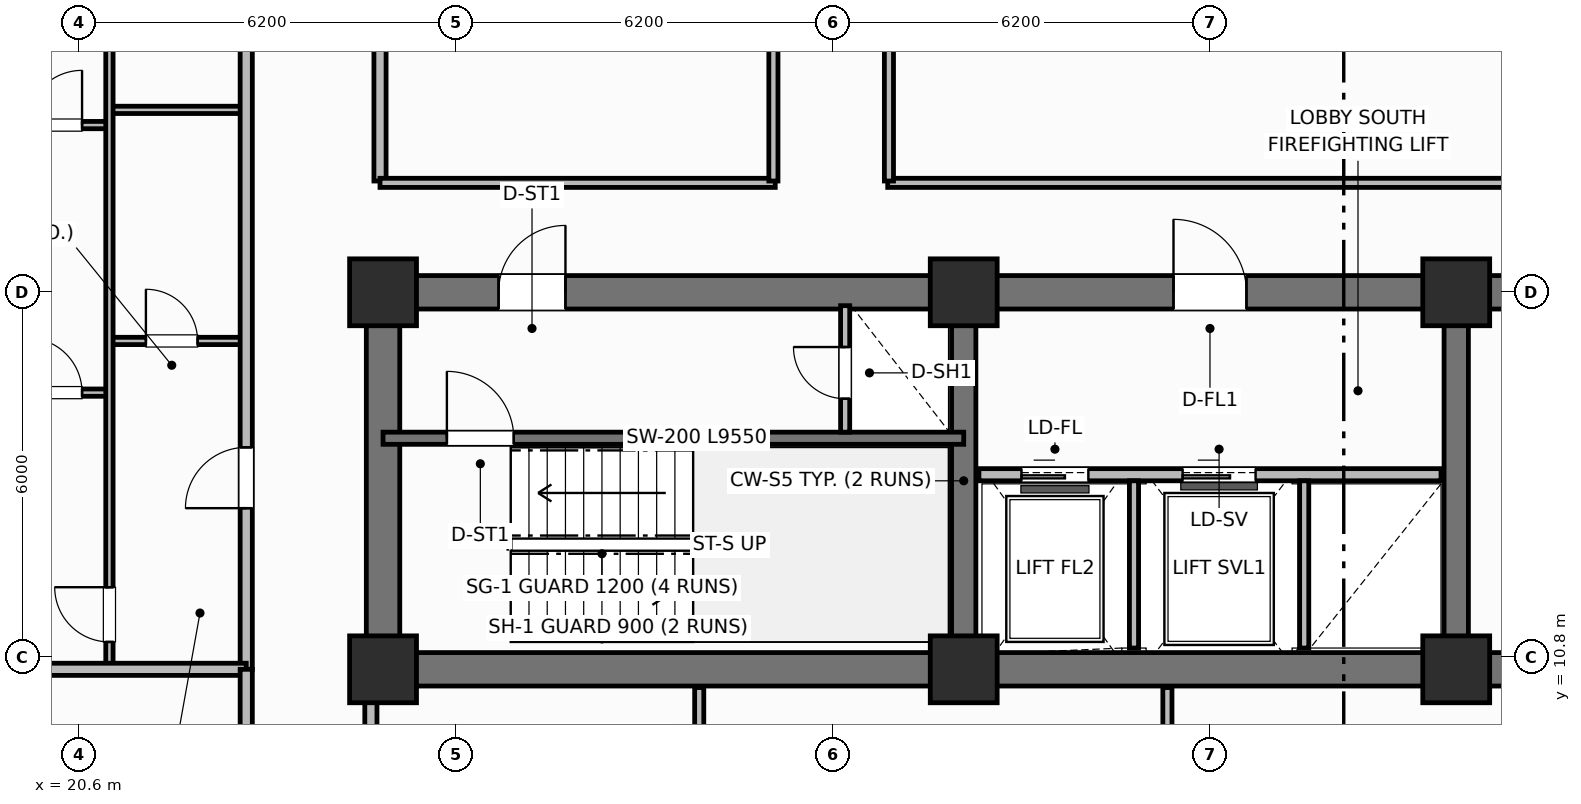
"""IFC4 building model, lengths in metres.
Left out: names, types, materials, properties, quantities, classifications, styles, units other than length and angle.
Written with IfcOpenShell. Run it as: python <this file> out.ifc"""

import sys

from ifc_helpers import new_model, si_unit, direction, frame, frame_2d, origin, origin_2d, place, context, subcontext, project, spatial, rectangle, extrude, element, fill, save


model = new_model("IFC4")
c1 = context("Model", 3, precision=1e-05, world=origin(), true_north=direction((0.0, 1.0)))
c2 = subcontext(c1, "Body", "Model", "MODEL_VIEW")
j1 = project(units=[si_unit("LENGTHUNIT", "METRE"), si_unit("PLANEANGLEUNIT", "RADIAN")], contexts=[c1])
p1 = place(None, origin())
s1 = spatial("IfcSite", under=j1, at=p1, CompositionType="ELEMENT")
p2 = place(p1, origin())
s2 = spatial("IfcBuilding", under=s1, at=p2, CompositionType="ELEMENT")
p3 = place(p2, frame((0.0, 0.0, 92.0)))
s3 = spatial("IfcBuildingStorey", under=s2, at=p3, CompositionType="ELEMENT", Elevation=92.0)
p4 = place(p3, frame((52.8, 10.6, 0.0), z_axis=(0.0, 0.0, 1.0), x_axis=(-1.0, 0.0, 0.0)))
e1 = element("IfcWall", 1, at=p4, inside=s3, PredefinedType="SHEAR", context=c2, shape_type="SweptSolid", body=[
    extrude(rectangle(XDim=27.2, YDim=0.55, at=frame_2d((13.6, 0.0))), origin(), (0.0, 0.0, 1.0), 3.7),
])
p5 = place(p3, frame((25.6, 10.875, 0.0), z_axis=(0.0, 0.0, 1.0), x_axis=(0.0, 1.0, 0.0)))
e2 = element("IfcWall", 2, at=p5, inside=s3, PredefinedType="SHEAR", context=c2, shape_type="SweptSolid", body=[
    extrude(rectangle(XDim=5.65, YDim=0.55, at=frame_2d((2.825, 0.0))), origin(), (0.0, 0.0, 1.0), 3.7),
])
p6 = place(p3, frame((25.6, 16.8, 0.0), z_axis=(0.0, 0.0, 1.0), x_axis=(1.0, 0.0, 0.0)))
e3 = element("IfcWall", 3, at=p6, inside=s3, PredefinedType="SHEAR", context=c2, shape_type="SweptSolid", body=[
    extrude(rectangle(XDim=27.2, YDim=0.55, at=frame_2d((13.6, 0.0))), origin(), (0.0, 0.0, 1.0), 3.7),
])
p7 = place(p6, frame((1.9, 0.0, 0.0)))
e4 = element("IfcOpeningElement", 4, at=p7, cuts=e3, PredefinedType="OPENING", context=c2, shape_type="SweptSolid", body=[
    extrude(rectangle(XDim=1.1, YDim=2.15, at=frame_2d((0.55, 1.075))), frame((0.0, 0.285, 0.0), z_axis=(0.0, -1.0, 0.0), x_axis=(1.0, 0.0, 0.0)), (0.0, 0.0, 1.0), 0.57),
])
p8 = place(p6, frame((13.0, 0.0, 0.0)))
e5 = element("IfcOpeningElement", 5, at=p8, cuts=e3, PredefinedType="OPENING", context=c2, shape_type="SweptSolid", body=[
    extrude(rectangle(XDim=1.2, YDim=2.15, at=frame_2d((0.6, 1.075))), frame((0.0, 0.285, 0.0), z_axis=(0.0, -1.0, 0.0), x_axis=(1.0, 0.0, 0.0)), (0.0, 0.0, 1.0), 0.57),
])
p9 = place(p6, frame((21.6, 0.0, 0.0)))
e6 = element("IfcOpeningElement", 6, at=p9, cuts=e3, PredefinedType="OPENING", context=c2, shape_type="SweptSolid", body=[
    extrude(rectangle(XDim=1.0, YDim=2.15, at=frame_2d((0.5, 1.075))), frame((0.0, 0.285, 0.0), z_axis=(0.0, -1.0, 0.0), x_axis=(1.0, 0.0, 0.0)), (0.0, 0.0, 1.0), 0.57),
])
for number, where, z_axis, x_axis in (
    (7, (35.15, 10.875, 0.0), (0.0, 0.0, 1.0), (0.0, 1.0, 0.0)),
    (8, (43.25, 10.875, 0.0), (0.0, 0.0, 1.0), (0.0, 1.0, 0.0)),
):
    element("IfcWall", number, at=place(p3, frame(where, z_axis=z_axis, x_axis=x_axis)), inside=s3, PredefinedType="SHEAR", context=c2, shape_type="SweptSolid", body=[
        extrude(rectangle(XDim=5.65, YDim=0.4, at=frame_2d((2.825, 0.0))), origin(), (0.0, 0.0, 1.0), 3.7),
    ])
for number, where, z_axis, x_axis in (
    (9, (25.6, 10.6, 0.0), (0.0, 0.0, 1.0), (1.0, 0.0, 0.0)),
    (10, (25.6, 16.8, 0.0), (0.0, 0.0, 1.0), (1.0, 0.0, 0.0)),
    (11, (35.15, 10.6, 0.0), (0.0, 0.0, 1.0), (1.0, 0.0, 0.0)),
    (12, (35.15, 16.8, 0.0), (0.0, 0.0, 1.0), (1.0, 0.0, 0.0)),
    (13, (43.25, 10.6, 0.0), (0.0, 0.0, 1.0), (1.0, 0.0, 0.0)),
    (14, (43.25, 16.8, 0.0), (0.0, 0.0, 1.0), (1.0, 0.0, 0.0)),
):
    element("IfcColumn", number, at=place(p3, frame(where, z_axis=z_axis, x_axis=x_axis)), inside=s3, PredefinedType="COLUMN", context=c2, shape_type="SweptSolid", body=[
        extrude(rectangle(XDim=1.1, YDim=1.1, at=origin_2d()), origin(), (0.0, 0.0, 1.0), 3.7),
    ])
p10 = place(p3, frame((25.6, 14.4, 0.0), z_axis=(0.0, 0.0, 1.0), x_axis=(1.0, 0.0, 0.0)))
e15 = element("IfcWall", 15, at=p10, inside=s3, PredefinedType="SHEAR", context=c2, shape_type="SweptSolid", body=[
    extrude(rectangle(XDim=9.55, YDim=0.2, at=frame_2d((4.775, 0.0))), origin(), (0.0, 0.0, 1.0), 3.7),
])
p11 = place(p10, frame((1.05, 0.0, 0.0)))
e16 = element("IfcOpeningElement", 16, at=p11, cuts=e15, PredefinedType="OPENING", context=c2, shape_type="SweptSolid", body=[
    extrude(rectangle(XDim=1.1, YDim=2.15, at=frame_2d((0.55, 1.075))), frame((0.0, 0.11, 0.0), z_axis=(0.0, -1.0, 0.0), x_axis=(1.0, 0.0, 0.0)), (0.0, 0.0, 1.0), 0.22),
])
p12 = place(p3, frame((33.2, 14.5, 0.0), z_axis=(0.0, 0.0, 1.0), x_axis=(0.0, 1.0, 0.0)))
e17 = element("IfcWall", 17, at=p12, inside=s3, PredefinedType="PARTITIONING", context=c2, shape_type="SweptSolid", body=[
    extrude(rectangle(XDim=2.08, YDim=0.15, at=frame_2d((1.04, 0.0))), origin(), (0.0, 0.0, 1.0), 2.53),
])
p13 = place(p12, frame((0.55, 0.0, 0.0)))
e18 = element("IfcOpeningElement", 18, at=p13, cuts=e17, PredefinedType="OPENING", context=c2, shape_type="SweptSolid", body=[
    extrude(rectangle(XDim=0.85, YDim=2.05, at=frame_2d((0.425, 1.025))), frame((0.0, 0.085, 0.0), z_axis=(0.0, -1.0, 0.0), x_axis=(1.0, 0.0, 0.0)), (0.0, 0.0, 1.0), 0.17),
])
p14 = place(p3, frame((35.4, 13.8, 0.0), z_axis=(0.0, 0.0, 1.0), x_axis=(1.0, 0.0, 0.0)))
e19 = element("IfcWall", 19, at=p14, inside=s3, PredefinedType="PARTITIONING", context=c2, shape_type="SweptSolid", body=[
    extrude(rectangle(XDim=7.6, YDim=0.2, at=frame_2d((3.8, 0.0))), origin(), (0.0, 0.0, 1.0), 2.3),
])
p15 = place(p14, frame((0.7, 0.0, 0.0)))
e20 = element("IfcOpeningElement", 20, at=p15, cuts=e19, PredefinedType="OPENING", context=c2, shape_type="SweptSolid", body=[
    extrude(rectangle(XDim=1.1, YDim=2.15, at=frame_2d((0.55, 1.075))), frame((0.0, 0.11, 0.0), z_axis=(0.0, -1.0, 0.0), x_axis=(1.0, 0.0, 0.0)), (0.0, 0.0, 1.0), 0.22),
])
p16 = place(p14, frame((3.35, 0.0, 0.0)))
e21 = element("IfcOpeningElement", 21, at=p16, cuts=e19, PredefinedType="OPENING", context=c2, shape_type="SweptSolid", body=[
    extrude(rectangle(XDim=1.2, YDim=2.15, at=frame_2d((0.6, 1.075))), frame((0.0, 0.11, 0.0), z_axis=(0.0, -1.0, 0.0), x_axis=(1.0, 0.0, 0.0)), (0.0, 0.0, 1.0), 0.22),
])
for number, where, z_axis, x_axis in (
    (22, (37.95, 10.95, 0.0), (0.0, 0.0, 1.0), (0.0, 1.0, 0.0)),
    (23, (40.75, 10.95, 0.0), (0.0, 0.0, 1.0), (0.0, 1.0, 0.0)),
):
    element("IfcWall", number, at=place(p3, frame(where, z_axis=z_axis, x_axis=x_axis)), inside=s3, PredefinedType="PARTITIONING", context=c2, shape_type="SweptSolid", body=[
        extrude(rectangle(XDim=2.75, YDim=0.15, at=frame_2d((1.375, 0.0))), origin(), (0.0, 0.0, 1.0), 2.53),
    ])
p17 = place(p3, frame((25.55, 18.63, 0.0), z_axis=(0.0, 0.0, 1.0), x_axis=(0.0, 1.0, 0.0)))
e24 = element("IfcWall", 24, at=p17, inside=s3, PredefinedType="PARTITIONING", context=c2, shape_type="SweptSolid", body=[
    extrude(rectangle(XDim=19.14, YDim=0.2, at=frame_2d((9.57, 0.0))), origin(), (0.0, 0.0, 1.0), 2.53),
])
p18 = place(p3, frame((25.55, 18.6, 0.0), z_axis=(0.0, 0.0, 1.0), x_axis=(1.0, 0.0, 0.0)))
e25 = element("IfcWall", 25, at=p18, inside=s3, PredefinedType="PARTITIONING", context=c2, shape_type="SweptSolid", body=[
    extrude(rectangle(XDim=6.5, YDim=0.15, at=frame_2d((3.25, 0.0))), origin(), (0.0, 0.0, 1.0), 2.53),
])
p19 = place(p3, frame((33.9, 18.6, 0.0), z_axis=(0.0, 0.0, 1.0), x_axis=(1.0, 0.0, 0.0)))
e26 = element("IfcWall", 26, at=p19, inside=s3, PredefinedType="PARTITIONING", context=c2, shape_type="SweptSolid", body=[
    extrude(rectangle(XDim=10.6, YDim=0.15, at=frame_2d((5.3, 0.0))), origin(), (0.0, 0.0, 1.0), 2.53),
])
p20 = place(p3, frame((32.02, 18.63, 0.0), z_axis=(0.0, 0.0, 1.0), x_axis=(0.0, 1.0, 0.0)))
e27 = element("IfcWall", 27, at=p20, inside=s3, PredefinedType="PARTITIONING", context=c2, shape_type="SweptSolid", body=[
    extrude(rectangle(XDim=19.14, YDim=0.15, at=frame_2d((9.57, 0.0))), origin(), (0.0, 0.0, 1.0), 2.53),
])
p21 = place(p20, frame((3.0, 0.0, 0.0)))
e28 = element("IfcOpeningElement", 28, at=p21, cuts=e27, PredefinedType="OPENING", context=c2, shape_type="SweptSolid", body=[
    extrude(rectangle(XDim=0.9, YDim=2.1, at=frame_2d((0.45, 1.05))), frame((0.0, 0.085, 0.0), z_axis=(0.0, -1.0, 0.0), x_axis=(1.0, 0.0, 0.0)), (0.0, 0.0, 1.0), 0.17),
])
p22 = place(p20, frame((11.5, 0.0, 0.0)))
e29 = element("IfcOpeningElement", 29, at=p22, cuts=e27, PredefinedType="OPENING", context=c2, shape_type="SweptSolid", body=[
    extrude(rectangle(XDim=0.9, YDim=2.1, at=frame_2d((0.45, 1.05))), frame((0.0, 0.085, 0.0), z_axis=(0.0, -1.0, 0.0), x_axis=(1.0, 0.0, 0.0)), (0.0, 0.0, 1.0), 0.17),
])
p23 = place(p3, frame((33.92, 18.63, 0.0), z_axis=(0.0, 0.0, 1.0), x_axis=(0.0, 1.0, 0.0)))
e30 = element("IfcWall", 30, at=p23, inside=s3, PredefinedType="PARTITIONING", context=c2, shape_type="SweptSolid", body=[
    extrude(rectangle(XDim=19.14, YDim=0.15, at=frame_2d((9.57, 0.0))), origin(), (0.0, 0.0, 1.0), 2.53),
])
p24 = place(p23, frame((2.4, 0.0, 0.0)))
e31 = element("IfcOpeningElement", 31, at=p24, cuts=e30, PredefinedType="OPENING", context=c2, shape_type="SweptSolid", body=[
    extrude(rectangle(XDim=0.9, YDim=2.1, at=frame_2d((0.45, 1.05))), frame((0.0, 0.085, 0.0), z_axis=(0.0, -1.0, 0.0), x_axis=(1.0, 0.0, 0.0)), (0.0, 0.0, 1.0), 0.17),
])
p25 = place(p3, frame((21.1, 16.0, 0.0), z_axis=(0.0, 0.0, 1.0), x_axis=(1.0, 0.0, 0.0)))
e32 = element("IfcWall", 32, at=p25, inside=s3, PredefinedType="PARTITIONING", context=c2, shape_type="SweptSolid", body=[
    extrude(rectangle(XDim=2.25, YDim=0.12, at=frame_2d((1.125, 0.0))), origin(), (0.0, 0.0, 1.0), 2.53),
])
p26 = place(p25, frame((0.6, 0.0, 0.0)))
e33 = element("IfcOpeningElement", 33, at=p26, cuts=e32, PredefinedType="OPENING", context=c2, shape_type="SweptSolid", body=[
    extrude(rectangle(XDim=0.85, YDim=2.1, at=frame_2d((0.425, 1.05))), frame((0.0, 0.07, 0.0), z_axis=(0.0, -1.0, 0.0), x_axis=(1.0, 0.0, 0.0)), (0.0, 0.0, 1.0), 0.14),
])
p27 = place(p3, frame((21.1, 19.8, 0.0), z_axis=(0.0, 0.0, 1.0), x_axis=(1.0, 0.0, 0.0)))
e34 = element("IfcWall", 34, at=p27, inside=s3, PredefinedType="PARTITIONING", context=c2, shape_type="SweptSolid", body=[
    extrude(rectangle(XDim=2.25, YDim=0.12, at=frame_2d((1.125, 0.0))), origin(), (0.0, 0.0, 1.0), 2.53),
])
p28 = place(p3, frame((14.57, 15.15, 0.0), z_axis=(0.0, 0.0, 1.0), x_axis=(1.0, 0.0, 0.0)))
e35 = element("IfcWall", 35, at=p28, inside=s3, PredefinedType="PARTITIONING", context=c2, shape_type="SweptSolid", body=[
    extrude(rectangle(XDim=6.53, YDim=0.12, at=frame_2d((3.265, 0.0))), origin(), (0.0, 0.0, 1.0), 2.53),
])
p29 = place(p28, frame((5.18, 0.0, 0.0)))
e36 = element("IfcOpeningElement", 36, at=p29, cuts=e35, PredefinedType="OPENING", context=c2, shape_type="SweptSolid", body=[
    extrude(rectangle(XDim=0.9, YDim=2.1, at=frame_2d((0.45, 1.05))), frame((0.0, 0.07, 0.0), z_axis=(0.0, -1.0, 0.0), x_axis=(1.0, 0.0, 0.0)), (0.0, 0.0, 1.0), 0.14),
])
p30 = place(p3, frame((14.57, 19.55, 0.0), z_axis=(0.0, 0.0, 1.0), x_axis=(1.0, 0.0, 0.0)))
e37 = element("IfcWall", 37, at=p30, inside=s3, PredefinedType="PARTITIONING", context=c2, shape_type="SweptSolid", body=[
    extrude(rectangle(XDim=6.53, YDim=0.12, at=frame_2d((3.265, 0.0))), origin(), (0.0, 0.0, 1.0), 2.53),
])
p31 = place(p30, frame((5.18, 0.0, 0.0)))
e38 = element("IfcOpeningElement", 38, at=p31, cuts=e37, PredefinedType="OPENING", context=c2, shape_type="SweptSolid", body=[
    extrude(rectangle(XDim=0.9, YDim=2.1, at=frame_2d((0.45, 1.05))), frame((0.0, 0.07, 0.0), z_axis=(0.0, -1.0, 0.0), x_axis=(1.0, 0.0, 0.0)), (0.0, 0.0, 1.0), 0.14),
])
p32 = place(p3, frame((21.1, 10.64, 0.0), z_axis=(0.0, 0.0, 1.0), x_axis=(0.0, 1.0, 0.0)))
e39 = element("IfcWall", 39, at=p32, inside=s3, PredefinedType="PARTITIONING", context=c2, shape_type="SweptSolid", body=[
    extrude(rectangle(XDim=19.12, YDim=0.12, at=frame_2d((9.56, 0.0))), origin(), (0.0, 0.0, 1.0), 2.53),
])
p33 = place(p32, frame((0.41, 0.0, 0.0)))
e40 = element("IfcOpeningElement", 40, at=p33, cuts=e39, PredefinedType="OPENING", context=c2, shape_type="SweptSolid", body=[
    extrude(rectangle(XDim=0.9, YDim=2.1, at=frame_2d((0.45, 1.05))), frame((0.0, 0.07, 0.0), z_axis=(0.0, -1.0, 0.0), x_axis=(1.0, 0.0, 0.0)), (0.0, 0.0, 1.0), 0.14),
])
p34 = place(p32, frame((12.105, 0.0, 0.0)))
e41 = element("IfcOpeningElement", 41, at=p34, cuts=e39, PredefinedType="OPENING", context=c2, shape_type="SweptSolid", body=[
    extrude(rectangle(XDim=0.82, YDim=2.08, at=frame_2d((0.41, 1.04))), frame((0.0, 0.07, 0.0), z_axis=(0.0, -1.0, 0.0), x_axis=(1.0, 0.0, 0.0)), (0.0, 0.0, 1.0), 0.14),
])
p35 = place(p3, frame((23.35, 10.6, 0.0), z_axis=(0.0, 0.0, 1.0), x_axis=(0.0, 1.0, 0.0)))
e42 = element("IfcWall", 42, at=p35, inside=s3, PredefinedType="PARTITIONING", context=c2, shape_type="SweptSolid", body=[
    extrude(rectangle(XDim=35.2, YDim=0.2, at=frame_2d((17.6, 0.0))), origin(), (0.0, 0.0, 1.0), 2.53),
])
p36 = place(p35, frame((2.65, 0.0, 0.0)))
e43 = element("IfcOpeningElement", 43, at=p36, cuts=e42, PredefinedType="OPENING", context=c2, shape_type="SweptSolid", body=[
    extrude(rectangle(XDim=1.0, YDim=2.15, at=frame_2d((0.5, 1.075))), frame((0.0, 0.11, 0.0), z_axis=(0.0, -1.0, 0.0), x_axis=(1.0, 0.0, 0.0)), (0.0, 0.0, 1.0), 0.22),
])
p37 = place(p35, frame((22.75, 0.0, 0.0)))
e44 = element("IfcOpeningElement", 44, at=p37, cuts=e42, PredefinedType="OPENING", context=c2, shape_type="SweptSolid", body=[
    extrude(rectangle(XDim=1.0, YDim=2.15, at=frame_2d((0.5, 1.075))), frame((0.0, 0.11, 0.0), z_axis=(0.0, -1.0, 0.0), x_axis=(1.0, 0.0, 0.0)), (0.0, 0.0, 1.0), 0.22),
])
p38 = place(p3, frame((14.99, 10.6, 0.0), z_axis=(0.0, 0.0, 1.0), x_axis=(1.0, 0.0, 0.0)))
e45 = element("IfcWall", 45, at=p38, inside=s3, PredefinedType="PARTITIONING", context=c2, shape_type="SweptSolid", body=[
    extrude(rectangle(XDim=8.36, YDim=0.2, at=frame_2d((4.18, 0.0))), origin(), (0.0, 0.0, 1.0), 2.53),
])
p39 = place(p3, frame((23.35, 4.97, 0.0), z_axis=(0.0, 0.0, 1.0), x_axis=(0.0, 1.0, 0.0)))
e46 = element("IfcWall", 46, at=p39, inside=s3, PredefinedType="PARTITIONING", context=c2, shape_type="SweptSolid", body=[
    extrude(rectangle(XDim=5.63, YDim=0.2, at=frame_2d((2.815, 0.0))), origin(), (0.0, 0.0, 1.0), 2.53),
])
p40 = place(p3, frame((30.8, 4.97, 0.0), z_axis=(0.0, 0.0, 1.0), x_axis=(0.0, 1.0, 0.0)))
e47 = element("IfcWall", 47, at=p40, inside=s3, PredefinedType="PARTITIONING", context=c2, shape_type="SweptSolid", body=[
    extrude(rectangle(XDim=5.33, YDim=0.15, at=frame_2d((2.665, 0.0))), origin(), (0.0, 0.0, 1.0), 2.53),
])
p41 = place(p40, frame((1.3, 0.0, 0.0)))
e48 = element("IfcOpeningElement", 48, at=p41, cuts=e47, PredefinedType="OPENING", context=c2, shape_type="SweptSolid", body=[
    extrude(rectangle(XDim=0.9, YDim=2.1, at=frame_2d((0.45, 1.05))), frame((0.0, 0.085, 0.0), z_axis=(0.0, -1.0, 0.0), x_axis=(1.0, 0.0, 0.0)), (0.0, 0.0, 1.0), 0.17),
])
p42 = place(p3, frame((38.5, 4.97, 0.0), z_axis=(0.0, 0.0, 1.0), x_axis=(0.0, 1.0, 0.0)))
e49 = element("IfcWall", 49, at=p42, inside=s3, PredefinedType="PARTITIONING", context=c2, shape_type="SweptSolid", body=[
    extrude(rectangle(XDim=5.33, YDim=0.15, at=frame_2d((2.665, 0.0))), origin(), (0.0, 0.0, 1.0), 2.53),
])
p43 = place(p3, frame((25.4, 5.62, 0.0), z_axis=(0.0, 0.0, 1.0), x_axis=(0.0, 1.0, 0.0)))
e50 = element("IfcWall", 50, at=p43, inside=s3, PredefinedType="PARTITIONING", context=c2, shape_type="SweptSolid", body=[
    extrude(rectangle(XDim=4.68, YDim=0.2, at=frame_2d((2.34, 0.0))), origin(), (0.0, 0.0, 1.0), 2.53),
])
p44 = place(p43, frame((1.3, 0.0, 0.0)))
e51 = element("IfcOpeningElement", 51, at=p44, cuts=e50, PredefinedType="OPENING", context=c2, shape_type="SweptSolid", body=[
    extrude(rectangle(XDim=0.9, YDim=2.1, at=frame_2d((0.45, 1.05))), frame((0.0, 0.11, 0.0), z_axis=(0.0, -1.0, 0.0), x_axis=(1.0, 0.0, 0.0)), (0.0, 0.0, 1.0), 0.22),
])
p45 = place(p11, origin())
e52 = element("IfcDoor", 52, at=p45, inside=s3, OperationType="SINGLE_SWING_LEFT", PredefinedType="DOOR", context=c2, shape_type="SweptSolid", body=[
    extrude(rectangle(XDim=1.1, YDim=2.15, at=frame_2d((0.55, 1.075))), frame((0.0, 0.025, 0.0), z_axis=(0.0, -1.0, 0.0), x_axis=(1.0, 0.0, 0.0)), (0.0, 0.0, 1.0), 0.05),
])
fill(e16, e52)
p46 = place(p13, origin())
e53 = element("IfcDoor", 53, at=p46, inside=s3, OperationType="SINGLE_SWING_RIGHT", PredefinedType="TRAPDOOR", context=c2, shape_type="SweptSolid", body=[
    extrude(rectangle(XDim=0.85, YDim=2.05, at=frame_2d((0.425, 1.025))), frame((0.0, 0.025, 0.0), z_axis=(0.0, -1.0, 0.0), x_axis=(1.0, 0.0, 0.0)), (0.0, 0.0, 1.0), 0.05),
])
fill(e18, e53)
p47 = place(p15, origin())
e54 = element("IfcDoor", 54, at=p47, inside=s3, OperationType="SLIDING_TO_LEFT", PredefinedType="DOOR", context=c2, shape_type="SweptSolid", body=[
    extrude(rectangle(XDim=1.1, YDim=2.15, at=frame_2d((0.55, 1.075))), frame((0.0, 0.025, 0.0), z_axis=(0.0, -1.0, 0.0), x_axis=(1.0, 0.0, 0.0)), (0.0, 0.0, 1.0), 0.05),
])
fill(e20, e54)
p48 = place(p16, origin())
e55 = element("IfcDoor", 55, at=p48, inside=s3, OperationType="SLIDING_TO_LEFT", PredefinedType="DOOR", context=c2, shape_type="SweptSolid", body=[
    extrude(rectangle(XDim=1.2, YDim=2.15, at=frame_2d((0.6, 1.075))), frame((0.0, 0.025, 0.0), z_axis=(0.0, -1.0, 0.0), x_axis=(1.0, 0.0, 0.0)), (0.0, 0.0, 1.0), 0.05),
])
fill(e21, e55)
p49 = place(p26, origin())
e56 = element("IfcDoor", 56, at=p49, inside=s3, OperationType="SINGLE_SWING_LEFT", PredefinedType="DOOR", context=c2, shape_type="SweptSolid", body=[
    extrude(rectangle(XDim=0.85, YDim=2.1, at=frame_2d((0.425, 1.05))), frame((0.0, 0.025, 0.0), z_axis=(0.0, -1.0, 0.0), x_axis=(1.0, 0.0, 0.0)), (0.0, 0.0, 1.0), 0.05),
])
fill(e33, e56)
p50 = place(p29, origin())
e57 = element("IfcDoor", 57, at=p50, inside=s3, OperationType="SINGLE_SWING_LEFT", PredefinedType="DOOR", context=c2, shape_type="SweptSolid", body=[
    extrude(rectangle(XDim=0.9, YDim=2.1, at=frame_2d((0.45, 1.05))), frame((0.0, 0.025, 0.0), z_axis=(0.0, -1.0, 0.0), x_axis=(1.0, 0.0, 0.0)), (0.0, 0.0, 1.0), 0.05),
])
fill(e36, e57)
p51 = place(p31, origin())
e58 = element("IfcDoor", 58, at=p51, inside=s3, OperationType="SINGLE_SWING_RIGHT", PredefinedType="DOOR", context=c2, shape_type="SweptSolid", body=[
    extrude(rectangle(XDim=0.9, YDim=2.1, at=frame_2d((0.45, 1.05))), frame((0.0, 0.025, 0.0), z_axis=(0.0, -1.0, 0.0), x_axis=(1.0, 0.0, 0.0)), (0.0, 0.0, 1.0), 0.05),
])
fill(e38, e58)
p52 = place(p33, origin())
e59 = element("IfcDoor", 59, at=p52, inside=s3, OperationType="SINGLE_SWING_RIGHT", PredefinedType="DOOR", context=c2, shape_type="SweptSolid", body=[
    extrude(rectangle(XDim=0.9, YDim=2.1, at=frame_2d((0.45, 1.05))), frame((0.0, 0.025, 0.0), z_axis=(0.0, -1.0, 0.0), x_axis=(1.0, 0.0, 0.0)), (0.0, 0.0, 1.0), 0.05),
])
fill(e40, e59)
p53 = place(p36, origin())
e60 = element("IfcDoor", 60, at=p53, inside=s3, OperationType="SINGLE_SWING_LEFT", PredefinedType="DOOR", context=c2, shape_type="SweptSolid", body=[
    extrude(rectangle(XDim=1.0, YDim=2.15, at=frame_2d((0.5, 1.075))), frame((0.0, 0.025, 0.0), z_axis=(0.0, -1.0, 0.0), x_axis=(1.0, 0.0, 0.0)), (0.0, 0.0, 1.0), 0.05),
])
fill(e43, e60)
p54 = place(p7, origin())
e61 = element("IfcDoor", 61, at=p54, inside=s3, OperationType="SINGLE_SWING_RIGHT", PredefinedType="DOOR", context=c2, shape_type="SweptSolid", body=[
    extrude(rectangle(XDim=1.1, YDim=2.15, at=frame_2d((0.55, 1.075))), frame((0.0, 0.025, 0.0), z_axis=(0.0, -1.0, 0.0), x_axis=(1.0, 0.0, 0.0)), (0.0, 0.0, 1.0), 0.05),
])
fill(e4, e61)
p55 = place(p8, origin())
e62 = element("IfcDoor", 62, at=p55, inside=s3, OperationType="SINGLE_SWING_LEFT", PredefinedType="DOOR", context=c2, shape_type="SweptSolid", body=[
    extrude(rectangle(XDim=1.2, YDim=2.15, at=frame_2d((0.6, 1.075))), frame((0.0, 0.025, 0.0), z_axis=(0.0, -1.0, 0.0), x_axis=(1.0, 0.0, 0.0)), (0.0, 0.0, 1.0), 0.05),
])
fill(e5, e62)
save(model, sys.argv[1])
